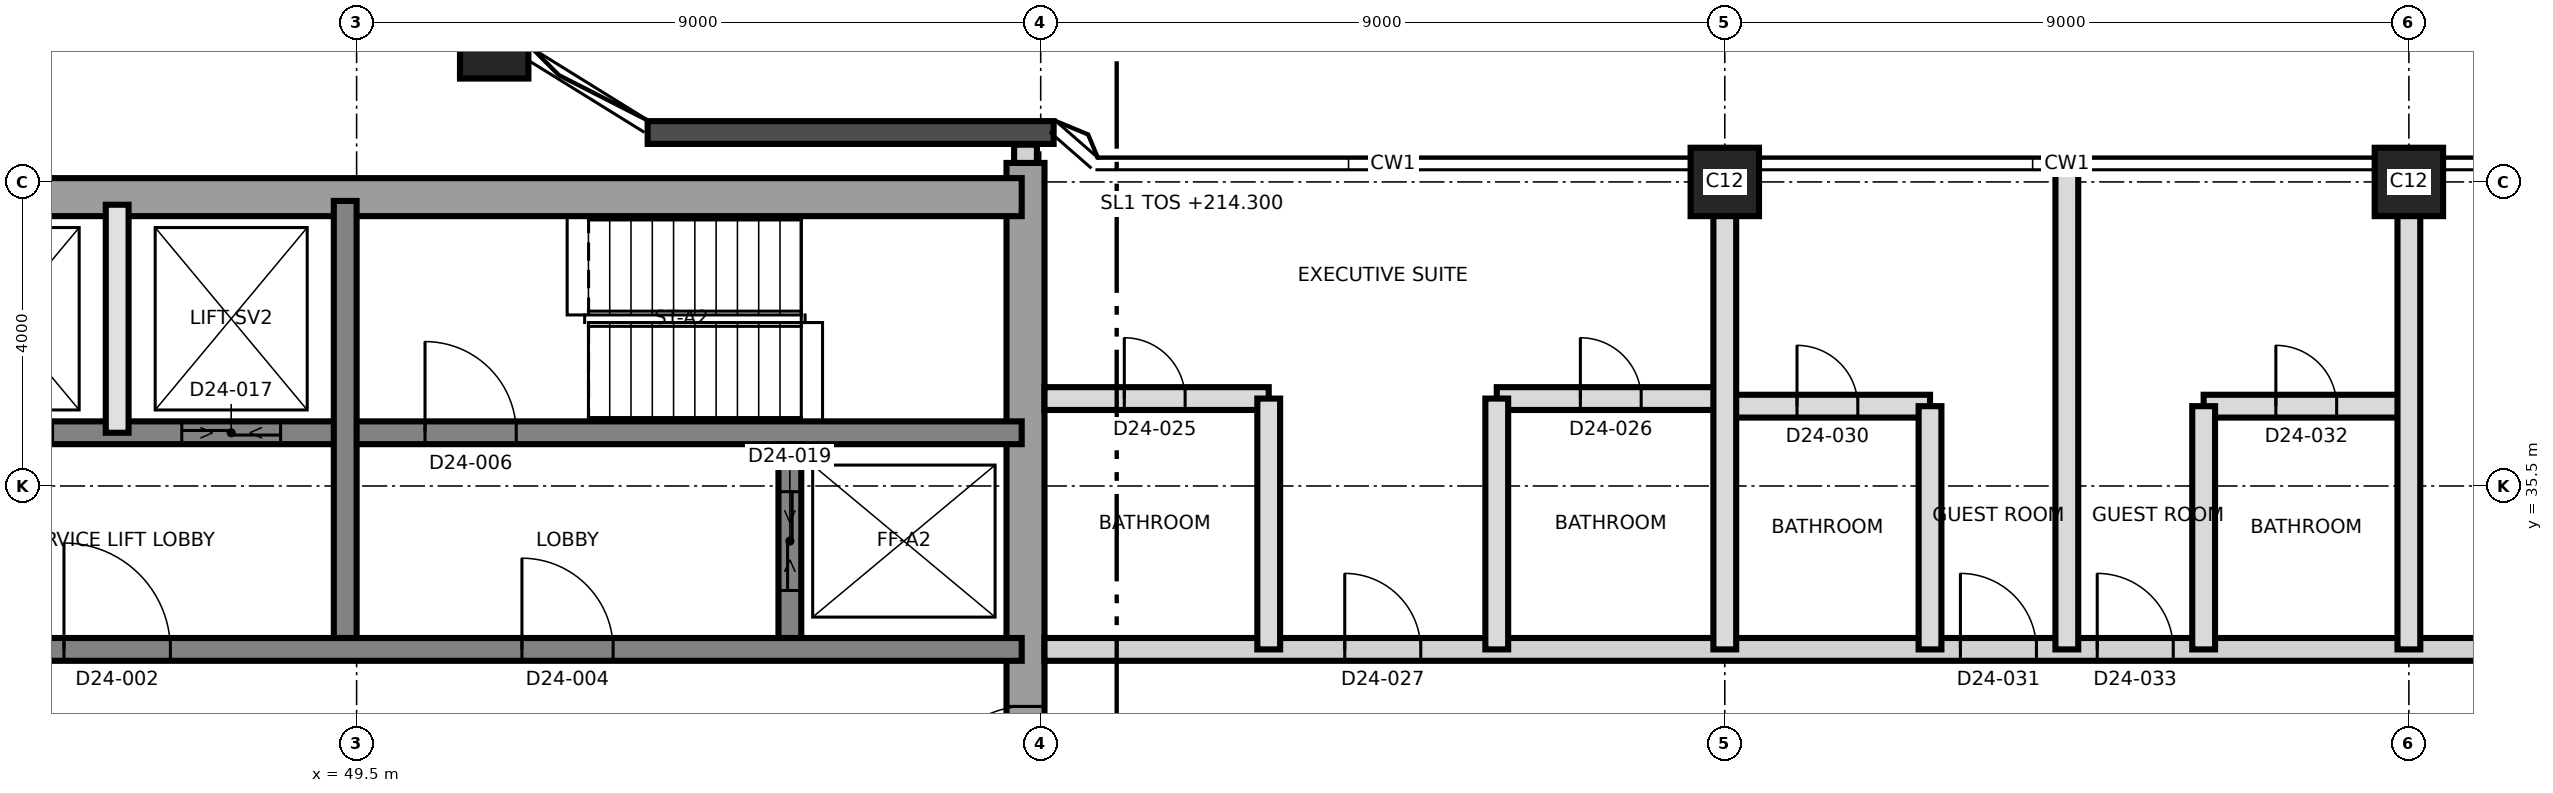
"""IFC4 building model, lengths in metres.
Left out: names, types, materials, properties, quantities, classifications, styles, units other than length and angle.
Written with IfcOpenShell. Run it as: python <this file> out.ifc"""

import sys

from ifc_helpers import new_model, si_unit, direction, frame, frame_2d, origin, origin_2d, place, context, subcontext, project, spatial, rectangle, extrude, element, fill, save


model = new_model("IFC4")
c1 = context("Model", 3, precision=1e-05, world=origin(), true_north=direction((0.0, 1.0)))
c2 = subcontext(c1, "Body", "Model", "MODEL_VIEW")
j1 = project(units=[si_unit("LENGTHUNIT", "METRE"), si_unit("PLANEANGLEUNIT", "RADIAN")], contexts=[c1])
p1 = place(None, origin())
s1 = spatial("IfcSite", under=j1, at=p1, CompositionType="ELEMENT")
p2 = place(p1, origin())
s2 = spatial("IfcBuilding", under=s1, at=p2, CompositionType="ELEMENT")
p3 = place(p2, frame((0.0, 0.0, 214.3)))
s3 = spatial("IfcBuildingStorey", under=s2, at=p3, CompositionType="ELEMENT", Elevation=214.3)
p4 = place(p3, frame((58.3, 21.25, 0.0), z_axis=(0.0, 0.0, 1.0), x_axis=(0.0, 1.0, 0.0)))
e1 = element("IfcWall", 1, at=p4, inside=s3, PredefinedType="SHEAR", context=c2, shape_type="SweptSolid", body=[
    extrude(rectangle(XDim=18.5, YDim=0.5, at=frame_2d((9.25, 0.0))), origin(), (0.0, 0.0, 1.0), 3.7),
])
p5 = place(p4, frame((10.15, 0.0, 0.0)))
e2 = element("IfcOpeningElement", 2, at=p5, cuts=e1, PredefinedType="OPENING", context=c2, shape_type="SweptSolid", body=[
    extrude(rectangle(XDim=1.2, YDim=2.1, at=frame_2d((0.6, 1.05))), frame((0.0, 0.26, 0.0), z_axis=(0.0, -1.0, 0.0), x_axis=(1.0, 0.0, 0.0)), (0.0, 0.0, 1.0), 0.52),
])
p6 = place(p3, frame((31.25, 39.3, 0.0), z_axis=(0.0, 0.0, 1.0), x_axis=(1.0, 0.0, 0.0)))
e3 = element("IfcWall", 3, at=p6, inside=s3, PredefinedType="SHEAR", context=c2, shape_type="SweptSolid", body=[
    extrude(rectangle(XDim=27.0, YDim=0.5, at=frame_2d((13.5, 0.0))), origin(), (0.0, 0.0, 1.0), 3.7),
])
p7 = place(p6, frame((10.45, 0.0, 0.0)))
e4 = element("IfcOpeningElement", 4, at=p7, cuts=e3, PredefinedType="OPENING", context=c2, shape_type="SweptSolid", body=[
    extrude(rectangle(XDim=1.2, YDim=2.1, at=frame_2d((0.6, 1.05))), frame((0.0, 0.26, 0.0), z_axis=(0.0, -1.0, 0.0), x_axis=(1.0, 0.0, 0.0)), (0.0, 0.0, 1.0), 0.52),
])
p8 = place(p3, frame((31.75, 33.35, 0.0), z_axis=(0.0, 0.0, 1.0), x_axis=(1.0, 0.0, 0.0)))
e5 = element("IfcWall", 5, at=p8, inside=s3, PredefinedType="SHEAR", context=c2, shape_type="SweptSolid", body=[
    extrude(rectangle(XDim=26.5, YDim=0.3, at=frame_2d((13.25, 0.0))), origin(), (0.0, 0.0, 1.0), 3.7),
])
p9 = place(p8, frame((13.9, 0.0, 0.0)))
e6 = element("IfcOpeningElement", 6, at=p9, cuts=e5, PredefinedType="OPENING", context=c2, shape_type="SweptSolid", body=[
    extrude(rectangle(XDim=1.4, YDim=2.1, at=frame_2d((0.7, 1.05))), frame((0.0, 0.16, 0.0), z_axis=(0.0, -1.0, 0.0), x_axis=(1.0, 0.0, 0.0)), (0.0, 0.0, 1.0), 0.32),
])
p10 = place(p8, frame((5.375, 0.0, 0.0)))
e7 = element("IfcOpeningElement", 7, at=p10, cuts=e5, PredefinedType="OPENING", context=c2, shape_type="SweptSolid", body=[
    extrude(rectangle(XDim=1.2, YDim=2.1, at=frame_2d((0.6, 1.05))), frame((0.0, 0.16, 0.0), z_axis=(0.0, -1.0, 0.0), x_axis=(1.0, 0.0, 0.0)), (0.0, 0.0, 1.0), 0.32),
])
p11 = place(p8, frame((19.925, 0.0, 0.0)))
e8 = element("IfcOpeningElement", 8, at=p11, cuts=e5, PredefinedType="OPENING", context=c2, shape_type="SweptSolid", body=[
    extrude(rectangle(XDim=1.2, YDim=2.1, at=frame_2d((0.6, 1.05))), frame((0.0, 0.16, 0.0), z_axis=(0.0, -1.0, 0.0), x_axis=(1.0, 0.0, 0.0)), (0.0, 0.0, 1.0), 0.32),
])
p12 = place(p3, frame((43.5, 36.2, 0.0), z_axis=(0.0, 0.0, 1.0), x_axis=(1.0, 0.0, 0.0)))
e9 = element("IfcWall", 9, at=p12, inside=s3, PredefinedType="SHEAR", context=c2, shape_type="SweptSolid", body=[
    extrude(rectangle(XDim=14.75, YDim=0.3, at=frame_2d((7.375, 0.0))), origin(), (0.0, 0.0, 1.0), 3.7),
])
p13 = place(p12, frame((6.9, 0.0, 0.0)))
e10 = element("IfcOpeningElement", 10, at=p13, cuts=e9, PredefinedType="OPENING", context=c2, shape_type="SweptSolid", body=[
    extrude(rectangle(XDim=1.2, YDim=2.1, at=frame_2d((0.6, 1.05))), frame((0.0, 0.16, 0.0), z_axis=(0.0, -1.0, 0.0), x_axis=(1.0, 0.0, 0.0)), (0.0, 0.0, 1.0), 0.32),
])
p14 = place(p12, frame((0.7, 0.0, 0.0)))
e11 = element("IfcOpeningElement", 11, at=p14, cuts=e9, PredefinedType="OPENING", context=c2, shape_type="SweptSolid", body=[
    extrude(rectangle(XDim=1.3, YDim=2.4, at=frame_2d((0.65, 1.2))), frame((0.0, 0.16, 0.0), z_axis=(0.0, -1.0, 0.0), x_axis=(1.0, 0.0, 0.0)), (0.0, 0.0, 1.0), 0.32),
])
p15 = place(p12, frame((3.7, 0.0, 0.0)))
e12 = element("IfcOpeningElement", 12, at=p15, cuts=e9, PredefinedType="OPENING", context=c2, shape_type="SweptSolid", body=[
    extrude(rectangle(XDim=1.3, YDim=2.4, at=frame_2d((0.65, 1.2))), frame((0.0, 0.16, 0.0), z_axis=(0.0, -1.0, 0.0), x_axis=(1.0, 0.0, 0.0)), (0.0, 0.0, 1.0), 0.32),
])
p16 = place(p3, frame((49.35, 33.5, 0.0), z_axis=(0.0, 0.0, 1.0), x_axis=(0.0, 1.0, 0.0)))
e13 = element("IfcWall", 13, at=p16, inside=s3, PredefinedType="SHEAR", context=c2, shape_type="SweptSolid", body=[
    extrude(rectangle(XDim=5.75, YDim=0.3, at=frame_2d((2.875, 0.0))), origin(), (0.0, 0.0, 1.0), 3.7),
])
p17 = place(p3, frame((55.2, 33.5, 0.0), z_axis=(0.0, 0.0, 1.0), x_axis=(0.0, 1.0, 0.0)))
e14 = element("IfcWall", 14, at=p17, inside=s3, PredefinedType="SHEAR", context=c2, shape_type="SweptSolid", body=[
    extrude(rectangle(XDim=2.55, YDim=0.3, at=frame_2d((1.275, 0.0))), origin(), (0.0, 0.0, 1.0), 3.7),
])
p18 = place(p17, frame((0.625, 0.0, 0.0)))
e15 = element("IfcOpeningElement", 15, at=p18, cuts=e14, PredefinedType="OPENING", context=c2, shape_type="SweptSolid", body=[
    extrude(rectangle(XDim=1.3, YDim=2.4, at=frame_2d((0.65, 1.2))), frame((0.0, 0.16, 0.0), z_axis=(0.0, -1.0, 0.0), x_axis=(1.0, 0.0, 0.0)), (0.0, 0.0, 1.0), 0.32),
])
for number, where, z_axis, x_axis in (
    (16, (67.5, 39.5, 0.0), (0.0, 0.0, 1.0), (1.0, 0.0, 0.0)),
    (17, (76.5, 39.5, 0.0), (0.0, 0.0, 1.0), (1.0, 0.0, 0.0)),
    (18, (51.31, 41.31, 0.0), (0.0, 0.0, 1.0), (1.0, 0.0, 0.0)),
):
    element("IfcColumn", number, at=place(p3, frame(where, z_axis=z_axis, x_axis=x_axis)), inside=s3, PredefinedType="COLUMN", context=c2, shape_type="SweptSolid", body=[
        extrude(rectangle(XDim=0.9, YDim=0.9, at=origin_2d()), origin(), (0.0, 0.0, 1.0), 3.7),
    ])
p19 = place(p3, frame((58.67, 40.15, 0.0), z_axis=(0.0, 0.0, 1.0), x_axis=(-1.0, 0.0, 0.0)))
e19 = element("IfcWall", 19, at=p19, inside=s3, PredefinedType="SOLIDWALL", context=c2, shape_type="SweptSolid", body=[
    extrude(rectangle(XDim=5.341, YDim=0.3, at=frame_2d((2.67, 0.0))), origin(), (0.0, 0.0, 1.0), 3.4),
])
p20 = place(p3, frame((46.35, 36.2, 0.0), z_axis=(0.0, 0.0, 1.0), x_axis=(0.0, 1.0, 0.0)))
e20 = element("IfcWall", 20, at=p20, inside=s3, PredefinedType="SOLIDWALL", context=c2, shape_type="SweptSolid", body=[
    extrude(rectangle(XDim=3.0, YDim=0.3, at=frame_2d((1.5, 0.0))), origin(), (0.0, 0.0, 1.0), 3.4),
])
p21 = place(p3, frame((58.55, 33.35, 0.0), z_axis=(0.0, 0.0, 1.0), x_axis=(1.0, 0.0, 0.0)))
e21 = element("IfcWall", 21, at=p21, inside=s3, PredefinedType="PARTITIONING", context=c2, shape_type="SweptSolid", body=[
    extrude(rectangle(XDim=26.78, YDim=0.3, at=frame_2d((13.39, 0.0))), origin(), (0.0, 0.0, 1.0), 3.4),
])
p22 = place(p21, frame((3.95, 0.0, 0.0)))
e22 = element("IfcOpeningElement", 22, at=p22, cuts=e21, PredefinedType="OPENING", context=c2, shape_type="SweptSolid", body=[
    extrude(rectangle(XDim=1.0, YDim=2.4, at=frame_2d((0.5, 1.2))), frame((0.0, 0.16, 0.0), z_axis=(0.0, -1.0, 0.0), x_axis=(1.0, 0.0, 0.0)), (0.0, 0.0, 1.0), 0.32),
])
p23 = place(p21, frame((12.05, 0.0, 0.0)))
e23 = element("IfcOpeningElement", 23, at=p23, cuts=e21, PredefinedType="OPENING", context=c2, shape_type="SweptSolid", body=[
    extrude(rectangle(XDim=1.0, YDim=2.1, at=frame_2d((0.5, 1.05))), frame((0.0, 0.16, 0.0), z_axis=(0.0, -1.0, 0.0), x_axis=(1.0, 0.0, 0.0)), (0.0, 0.0, 1.0), 0.32),
])
p24 = place(p21, frame((13.85, 0.0, 0.0)))
e24 = element("IfcOpeningElement", 24, at=p24, cuts=e21, PredefinedType="OPENING", context=c2, shape_type="SweptSolid", body=[
    extrude(rectangle(XDim=1.0, YDim=2.1, at=frame_2d((0.5, 1.05))), frame((0.0, 0.16, 0.0), z_axis=(0.0, -1.0, 0.0), x_axis=(1.0, 0.0, 0.0)), (0.0, 0.0, 1.0), 0.32),
])
p25 = place(p21, frame((20.3, 0.0, 0.0)))
e25 = element("IfcOpeningElement", 25, at=p25, cuts=e21, PredefinedType="OPENING", context=c2, shape_type="SweptSolid", body=[
    extrude(rectangle(XDim=1.0, YDim=2.4, at=frame_2d((0.5, 1.2))), frame((0.0, 0.16, 0.0), z_axis=(0.0, -1.0, 0.0), x_axis=(1.0, 0.0, 0.0)), (0.0, 0.0, 1.0), 0.32),
])
p26 = place(p3, frame((67.5, 36.55, 0.0), z_axis=(0.0, 0.0, 1.0), x_axis=(1.0, 0.0, 0.0)))
e26 = element("IfcWall", 26, at=p26, inside=s3, PredefinedType="PARTITIONING", context=c2, shape_type="SweptSolid", body=[
    extrude(rectangle(XDim=2.7, YDim=0.3, at=frame_2d((1.35, 0.0))), origin(), (0.0, 0.0, 1.0), 3.4),
])
p27 = place(p26, frame((0.95, 0.0, 0.0)))
e27 = element("IfcOpeningElement", 27, at=p27, cuts=e26, PredefinedType="OPENING", context=c2, shape_type="SweptSolid", body=[
    extrude(rectangle(XDim=0.8, YDim=2.1, at=frame_2d((0.4, 1.05))), frame((0.0, 0.16, 0.0), z_axis=(0.0, -1.0, 0.0), x_axis=(1.0, 0.0, 0.0)), (0.0, 0.0, 1.0), 0.32),
])
p28 = place(p3, frame((73.8, 36.55, 0.0), z_axis=(0.0, 0.0, 1.0), x_axis=(1.0, 0.0, 0.0)))
e28 = element("IfcWall", 28, at=p28, inside=s3, PredefinedType="PARTITIONING", context=c2, shape_type="SweptSolid", body=[
    extrude(rectangle(XDim=2.7, YDim=0.3, at=frame_2d((1.35, 0.0))), origin(), (0.0, 0.0, 1.0), 3.4),
])
p29 = place(p28, frame((0.95, 0.0, 0.0)))
e29 = element("IfcOpeningElement", 29, at=p29, cuts=e28, PredefinedType="OPENING", context=c2, shape_type="SweptSolid", body=[
    extrude(rectangle(XDim=0.8, YDim=2.1, at=frame_2d((0.4, 1.05))), frame((0.0, 0.16, 0.0), z_axis=(0.0, -1.0, 0.0), x_axis=(1.0, 0.0, 0.0)), (0.0, 0.0, 1.0), 0.32),
])
p30 = place(p3, frame((58.55, 36.65, 0.0), z_axis=(0.0, 0.0, 1.0), x_axis=(1.0, 0.0, 0.0)))
e30 = element("IfcWall", 30, at=p30, inside=s3, PredefinedType="PARTITIONING", context=c2, shape_type="SweptSolid", body=[
    extrude(rectangle(XDim=2.95, YDim=0.3, at=frame_2d((1.475, 0.0))), origin(), (0.0, 0.0, 1.0), 3.4),
])
p31 = place(p30, frame((1.05, 0.0, 0.0)))
e31 = element("IfcOpeningElement", 31, at=p31, cuts=e30, PredefinedType="OPENING", context=c2, shape_type="SweptSolid", body=[
    extrude(rectangle(XDim=0.8, YDim=2.1, at=frame_2d((0.4, 1.05))), frame((0.0, 0.16, 0.0), z_axis=(0.0, -1.0, 0.0), x_axis=(1.0, 0.0, 0.0)), (0.0, 0.0, 1.0), 0.32),
])
p32 = place(p3, frame((64.5, 36.65, 0.0), z_axis=(0.0, 0.0, 1.0), x_axis=(1.0, 0.0, 0.0)))
e32 = element("IfcWall", 32, at=p32, inside=s3, PredefinedType="PARTITIONING", context=c2, shape_type="SweptSolid", body=[
    extrude(rectangle(XDim=3.0, YDim=0.3, at=frame_2d((1.5, 0.0))), origin(), (0.0, 0.0, 1.0), 3.4),
])
p33 = place(p32, frame((1.1, 0.0, 0.0)))
e33 = element("IfcOpeningElement", 33, at=p33, cuts=e32, PredefinedType="OPENING", context=c2, shape_type="SweptSolid", body=[
    extrude(rectangle(XDim=0.8, YDim=2.1, at=frame_2d((0.4, 1.05))), frame((0.0, 0.16, 0.0), z_axis=(0.0, -1.0, 0.0), x_axis=(1.0, 0.0, 0.0)), (0.0, 0.0, 1.0), 0.32),
])
for number, where, z_axis, x_axis in (
    (34, (61.5, 33.35, 0.0), (0.0, 0.0, 1.0), (0.0, 1.0, 0.0)),
    (35, (64.5, 33.35, 0.0), (0.0, 0.0, 1.0), (0.0, 1.0, 0.0)),
):
    element("IfcWall", number, at=place(p3, frame(where, z_axis=z_axis, x_axis=x_axis)), inside=s3, PredefinedType="PARTITIONING", context=c2, shape_type="SweptSolid", body=[
        extrude(rectangle(XDim=3.3, YDim=0.3, at=frame_2d((1.65, 0.0))), origin(), (0.0, 0.0, 1.0), 3.4),
    ])
p34 = place(p3, frame((67.5, 33.35, 0.0), z_axis=(0.0, 0.0, 1.0), x_axis=(0.0, 1.0, 0.0)))
e36 = element("IfcWall", 36, at=p34, inside=s3, PredefinedType="PARTITIONING", context=c2, shape_type="SweptSolid", body=[
    extrude(rectangle(XDim=6.12, YDim=0.3, at=frame_2d((3.06, 0.0))), origin(), (0.0, 0.0, 1.0), 3.4),
])
p35 = place(p3, frame((70.2, 33.35, 0.0), z_axis=(0.0, 0.0, 1.0), x_axis=(0.0, 1.0, 0.0)))
e37 = element("IfcWall", 37, at=p35, inside=s3, PredefinedType="PARTITIONING", context=c2, shape_type="SweptSolid", body=[
    extrude(rectangle(XDim=3.2, YDim=0.3, at=frame_2d((1.6, 0.0))), origin(), (0.0, 0.0, 1.0), 3.4),
])
p36 = place(p3, frame((72.0, 33.35, 0.0), z_axis=(0.0, 0.0, 1.0), x_axis=(0.0, 1.0, 0.0)))
e38 = element("IfcWall", 38, at=p36, inside=s3, PredefinedType="PARTITIONING", context=c2, shape_type="SweptSolid", body=[
    extrude(rectangle(XDim=6.3, YDim=0.3, at=frame_2d((3.15, 0.0))), origin(), (0.0, 0.0, 1.0), 3.4),
])
p37 = place(p3, frame((73.8, 33.35, 0.0), z_axis=(0.0, 0.0, 1.0), x_axis=(0.0, 1.0, 0.0)))
e39 = element("IfcWall", 39, at=p37, inside=s3, PredefinedType="PARTITIONING", context=c2, shape_type="SweptSolid", body=[
    extrude(rectangle(XDim=3.2, YDim=0.3, at=frame_2d((1.6, 0.0))), origin(), (0.0, 0.0, 1.0), 3.4),
])
p38 = place(p3, frame((76.5, 33.35, 0.0), z_axis=(0.0, 0.0, 1.0), x_axis=(0.0, 1.0, 0.0)))
e40 = element("IfcWall", 40, at=p38, inside=s3, PredefinedType="PARTITIONING", context=c2, shape_type="SweptSolid", body=[
    extrude(rectangle(XDim=6.12, YDim=0.3, at=frame_2d((3.06, 0.0))), origin(), (0.0, 0.0, 1.0), 3.4),
])
p39 = place(p3, frame((58.3, 39.75, 0.0), z_axis=(0.0, 0.0, 1.0), x_axis=(0.0, 1.0, 0.0)))
e41 = element("IfcWall", 41, at=p39, inside=s3, PredefinedType="PARTITIONING", context=c2, shape_type="SweptSolid", body=[
    extrude(rectangle(XDim=0.24, YDim=0.3, at=frame_2d((0.12, 0.0))), origin(), (0.0, 0.0, 1.0), 3.4),
])
p40 = place(p9, origin())
e42 = element("IfcDoor", 42, at=p40, inside=s3, OperationType="SINGLE_SWING_RIGHT", PredefinedType="DOOR", context=c2, shape_type="SweptSolid", body=[
    extrude(rectangle(XDim=1.4, YDim=2.1, at=frame_2d((0.7, 1.05))), frame((0.0, 0.025, 0.0), z_axis=(0.0, -1.0, 0.0), x_axis=(1.0, 0.0, 0.0)), (0.0, 0.0, 1.0), 0.05),
])
fill(e6, e42)
p41 = place(p11, origin())
e43 = element("IfcDoor", 43, at=p41, inside=s3, OperationType="SINGLE_SWING_RIGHT", PredefinedType="DOOR", context=c2, shape_type="SweptSolid", body=[
    extrude(rectangle(XDim=1.2, YDim=2.1, at=frame_2d((0.6, 1.05))), frame((0.0, 0.025, 0.0), z_axis=(0.0, -1.0, 0.0), x_axis=(1.0, 0.0, 0.0)), (0.0, 0.0, 1.0), 0.05),
])
fill(e8, e43)
p42 = place(p13, origin())
e44 = element("IfcDoor", 44, at=p42, inside=s3, OperationType="SINGLE_SWING_LEFT", PredefinedType="DOOR", context=c2, shape_type="SweptSolid", body=[
    extrude(rectangle(XDim=1.2, YDim=2.1, at=frame_2d((0.6, 1.05))), frame((0.0, 0.025, 0.0), z_axis=(0.0, -1.0, 0.0), x_axis=(1.0, 0.0, 0.0)), (0.0, 0.0, 1.0), 0.05),
])
fill(e10, e44)
p43 = place(p5, origin())
e45 = element("IfcDoor", 45, at=p43, inside=s3, OperationType="SINGLE_SWING_LEFT", PredefinedType="DOOR", context=c2, shape_type="SweptSolid", body=[
    extrude(rectangle(XDim=1.2, YDim=2.1, at=frame_2d((0.6, 1.05))), frame((0.0, 0.025, 0.0), z_axis=(0.0, -1.0, 0.0), x_axis=(1.0, 0.0, 0.0)), (0.0, 0.0, 1.0), 0.05),
])
fill(e2, e45)
p44 = place(p15, origin())
e46 = element("IfcDoor", 46, at=p44, inside=s3, OperationType="SLIDING_TO_LEFT", PredefinedType="DOOR", context=c2, shape_type="SweptSolid", body=[
    extrude(rectangle(XDim=1.3, YDim=2.4, at=frame_2d((0.65, 1.2))), frame((0.0, 0.025, 0.0), z_axis=(0.0, -1.0, 0.0), x_axis=(1.0, 0.0, 0.0)), (0.0, 0.0, 1.0), 0.05),
])
fill(e12, e46)
p45 = place(p18, origin())
e47 = element("IfcDoor", 47, at=p45, inside=s3, OperationType="SLIDING_TO_LEFT", PredefinedType="DOOR", context=c2, shape_type="SweptSolid", body=[
    extrude(rectangle(XDim=1.3, YDim=2.4, at=frame_2d((0.65, 1.2))), frame((0.0, 0.025, 0.0), z_axis=(0.0, -1.0, 0.0), x_axis=(1.0, 0.0, 0.0)), (0.0, 0.0, 1.0), 0.05),
])
fill(e15, e47)
p46 = place(p31, origin())
e48 = element("IfcDoor", 48, at=p46, inside=s3, OperationType="SINGLE_SWING_LEFT", PredefinedType="DOOR", context=c2, shape_type="SweptSolid", body=[
    extrude(rectangle(XDim=0.8, YDim=2.1, at=frame_2d((0.4, 1.05))), frame((0.0, 0.025, 0.0), z_axis=(0.0, -1.0, 0.0), x_axis=(1.0, 0.0, 0.0)), (0.0, 0.0, 1.0), 0.05),
])
fill(e31, e48)
p47 = place(p33, origin())
e49 = element("IfcDoor", 49, at=p47, inside=s3, OperationType="SINGLE_SWING_RIGHT", PredefinedType="DOOR", context=c2, shape_type="SweptSolid", body=[
    extrude(rectangle(XDim=0.8, YDim=2.1, at=frame_2d((0.4, 1.05))), frame((0.0, 0.025, 0.0), z_axis=(0.0, -1.0, 0.0), x_axis=(1.0, 0.0, 0.0)), (0.0, 0.0, 1.0), 0.05),
])
fill(e33, e49)
p48 = place(p22, origin())
e50 = element("IfcDoor", 50, at=p48, inside=s3, OperationType="SINGLE_SWING_LEFT", PredefinedType="DOOR", context=c2, shape_type="SweptSolid", body=[
    extrude(rectangle(XDim=1.0, YDim=2.4, at=frame_2d((0.5, 1.2))), frame((0.0, 0.025, 0.0), z_axis=(0.0, -1.0, 0.0), x_axis=(1.0, 0.0, 0.0)), (0.0, 0.0, 1.0), 0.05),
])
fill(e22, e50)
p49 = place(p27, origin())
e51 = element("IfcDoor", 51, at=p49, inside=s3, OperationType="SINGLE_SWING_LEFT", PredefinedType="DOOR", context=c2, shape_type="SweptSolid", body=[
    extrude(rectangle(XDim=0.8, YDim=2.1, at=frame_2d((0.4, 1.05))), frame((0.0, 0.025, 0.0), z_axis=(0.0, -1.0, 0.0), x_axis=(1.0, 0.0, 0.0)), (0.0, 0.0, 1.0), 0.05),
])
fill(e27, e51)
p50 = place(p23, origin())
e52 = element("IfcDoor", 52, at=p50, inside=s3, OperationType="SINGLE_SWING_RIGHT", PredefinedType="DOOR", context=c2, shape_type="SweptSolid", body=[
    extrude(rectangle(XDim=1.0, YDim=2.1, at=frame_2d((0.5, 1.05))), frame((0.0, 0.025, 0.0), z_axis=(0.0, -1.0, 0.0), x_axis=(1.0, 0.0, 0.0)), (0.0, 0.0, 1.0), 0.05),
])
fill(e23, e52)
p51 = place(p29, origin())
e53 = element("IfcDoor", 53, at=p51, inside=s3, OperationType="SINGLE_SWING_RIGHT", PredefinedType="DOOR", context=c2, shape_type="SweptSolid", body=[
    extrude(rectangle(XDim=0.8, YDim=2.1, at=frame_2d((0.4, 1.05))), frame((0.0, 0.025, 0.0), z_axis=(0.0, -1.0, 0.0), x_axis=(1.0, 0.0, 0.0)), (0.0, 0.0, 1.0), 0.05),
])
fill(e29, e53)
p52 = place(p24, origin())
e54 = element("IfcDoor", 54, at=p52, inside=s3, OperationType="SINGLE_SWING_LEFT", PredefinedType="DOOR", context=c2, shape_type="SweptSolid", body=[
    extrude(rectangle(XDim=1.0, YDim=2.1, at=frame_2d((0.5, 1.05))), frame((0.0, 0.025, 0.0), z_axis=(0.0, -1.0, 0.0), x_axis=(1.0, 0.0, 0.0)), (0.0, 0.0, 1.0), 0.05),
])
fill(e24, e54)
save(model, sys.argv[1])
